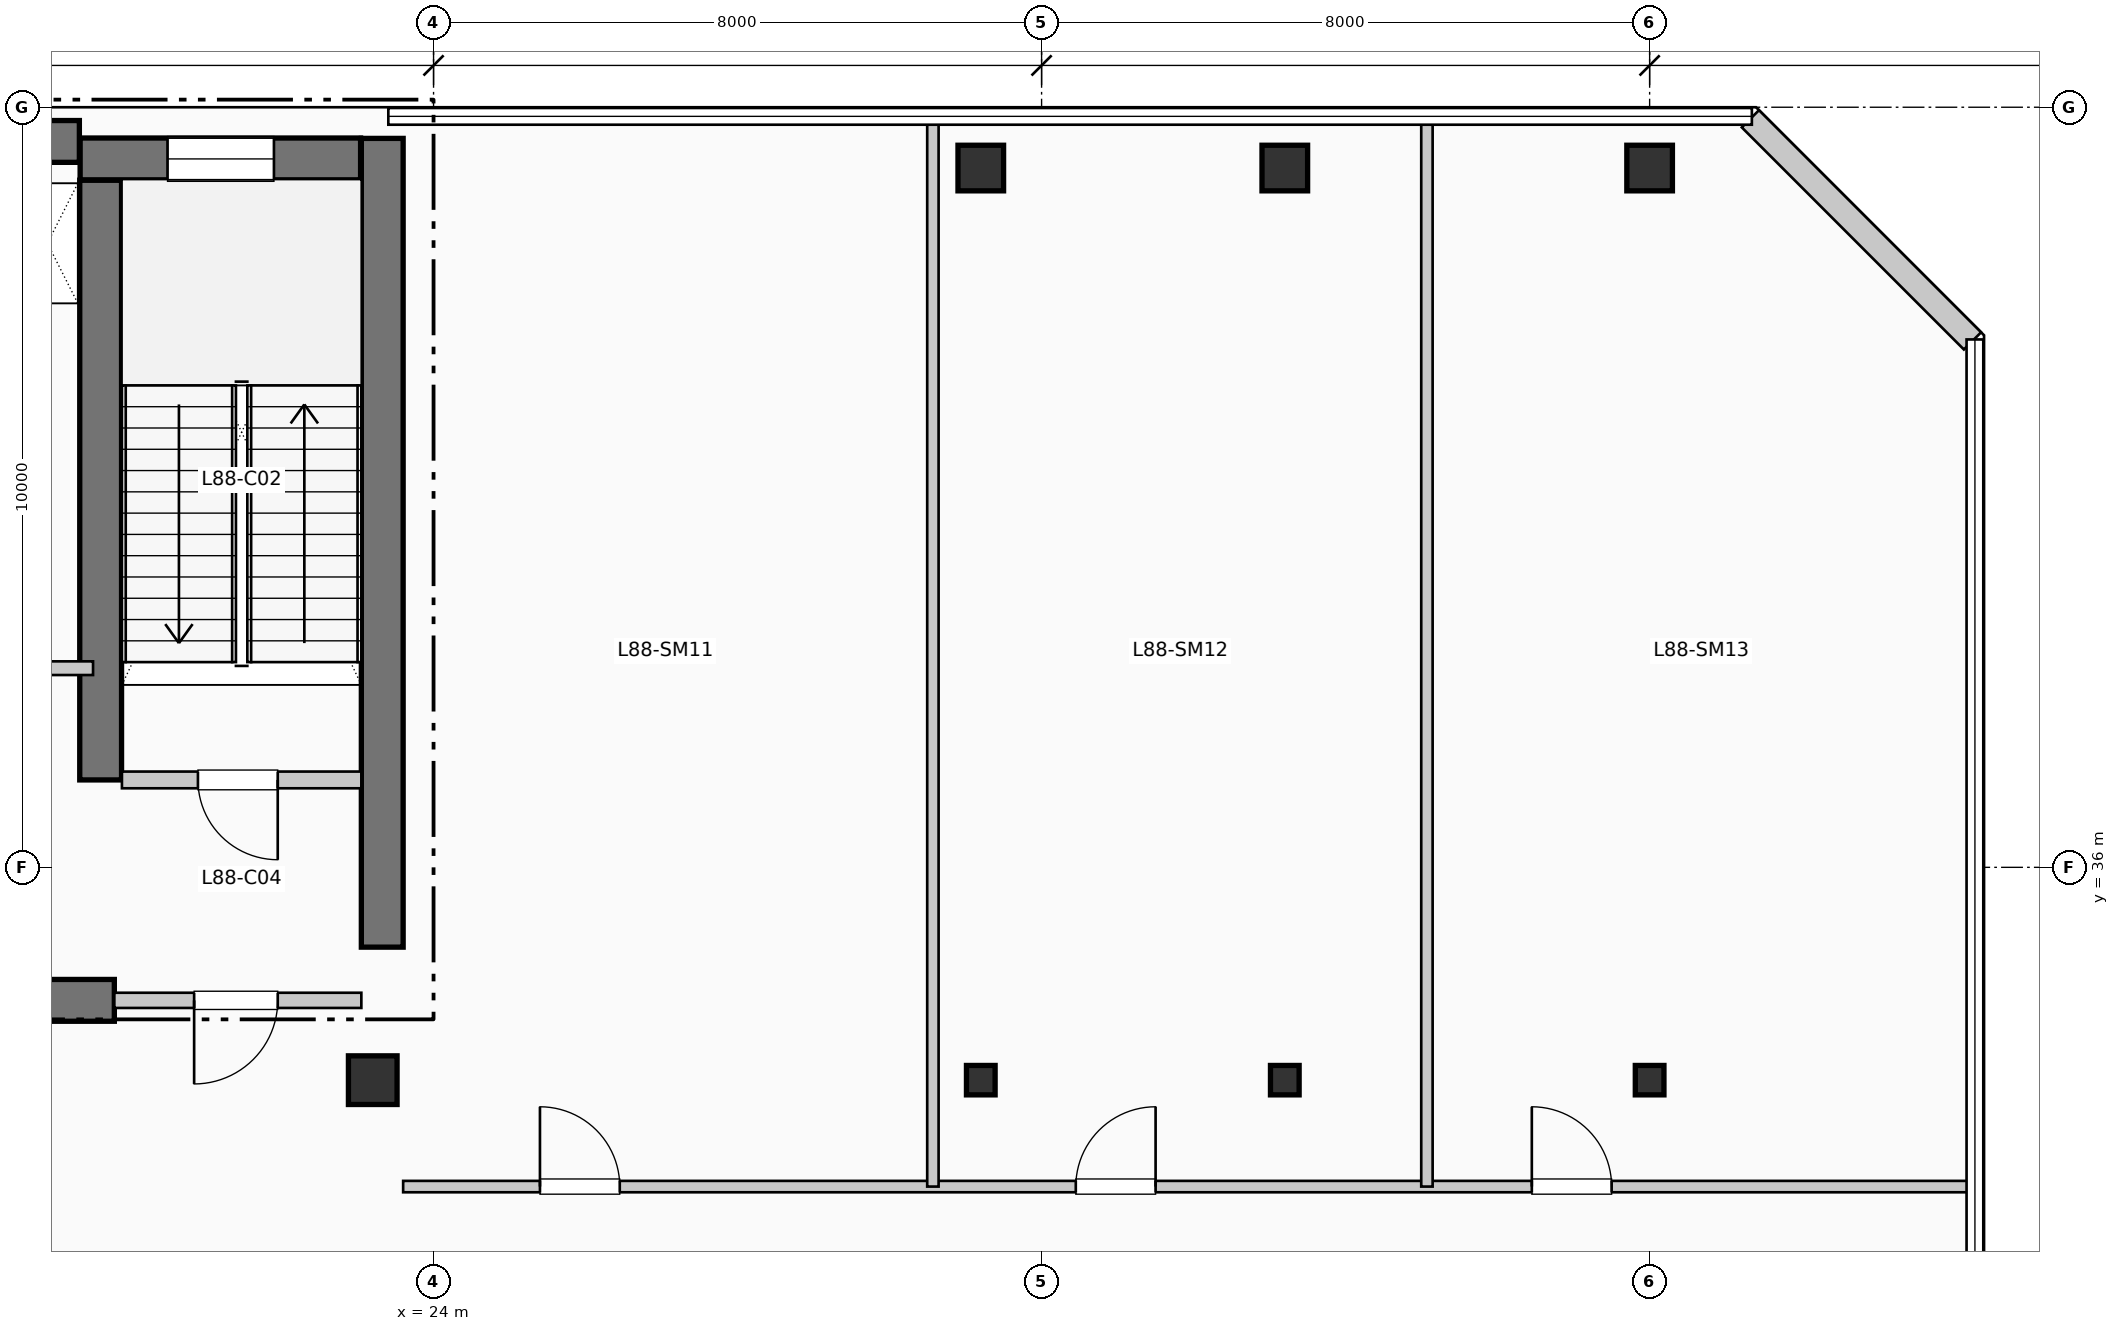
"""IFC4 building model, lengths in metres.
Left out: names, types, materials, properties, quantities, classifications, styles, units other than length and angle.
Written with IfcOpenShell. Run it as: python <this file> out.ifc"""

import sys

from ifc_helpers import new_model, si_unit, direction, frame, frame_2d, origin, origin_2d, place, context, subcontext, project, spatial, rectangle, i_section, extrude, element, fill, save


model = new_model("IFC4")
c1 = context("Model", 3, precision=1e-05, world=origin(), true_north=direction((0.0, 1.0)))
c2 = subcontext(c1, "Body", "Model", "MODEL_VIEW")
j1 = project(units=[si_unit("LENGTHUNIT", "METRE"), si_unit("PLANEANGLEUNIT", "RADIAN")], contexts=[c1])
p1 = place(None, origin())
s1 = spatial("IfcSite", under=j1, at=p1, CompositionType="ELEMENT")
p2 = place(p1, origin())
s2 = spatial("IfcBuilding", under=s1, at=p2, CompositionType="ELEMENT")
p3 = place(p2, frame((0.0, 0.0, 361.35)))
s3 = spatial("IfcBuildingStorey", under=s2, at=p3, CompositionType="ELEMENT", Elevation=361.35)
p4 = place(p3, frame((5.36, 45.55, 0.0), z_axis=(0.0, 0.0, 1.0), x_axis=(1.0, 0.0, 0.0)))
e1 = element("IfcWall", 1, at=p4, inside=s3, PredefinedType="SHEAR", context=c2, shape_type="SweptSolid", body=[
    extrude(rectangle(XDim=13.98, YDim=0.55, at=frame_2d((6.99, 0.0))), origin(), (0.0, 0.0, 1.0), 4.62),
])
p5 = place(p3, frame((23.325, 34.95, 0.0), z_axis=(0.0, 0.0, 1.0), x_axis=(0.0, 1.0, 0.0)))
e2 = element("IfcWall", 2, at=p5, inside=s3, PredefinedType="SHEAR", context=c2, shape_type="SweptSolid", body=[
    extrude(rectangle(XDim=10.64, YDim=0.55, at=frame_2d((5.32, 0.0))), origin(), (0.0, 0.0, 1.0), 4.62),
])
p6 = place(p3, frame((13.68, 34.25, 0.0), z_axis=(0.0, 0.0, 1.0), x_axis=(1.0, 0.0, 0.0)))
e3 = element("IfcWall", 3, at=p6, inside=s3, PredefinedType="SHEAR", context=c2, shape_type="SweptSolid", body=[
    extrude(rectangle(XDim=6.12, YDim=0.55, at=frame_2d((3.06, 0.0))), origin(), (0.0, 0.0, 1.0), 4.62),
])
p7 = place(p3, frame((19.62, 37.15, 0.0), z_axis=(0.0, 0.0, 1.0), x_axis=(0.0, 1.0, 0.0)))
e4 = element("IfcWall", 4, at=p7, inside=s3, PredefinedType="SHEAR", context=c2, shape_type="SweptSolid", body=[
    extrude(rectangle(XDim=7.89, YDim=0.55, at=frame_2d((3.945, 0.0))), origin(), (0.0, 0.0, 1.0), 4.62),
])
p8 = place(p3, frame((19.35, 45.32, 0.0), z_axis=(0.0, 0.0, 1.0), x_axis=(1.0, 0.0, 0.0)))
e5 = element("IfcWall", 5, at=p8, inside=s3, PredefinedType="SHEAR", context=c2, shape_type="SweptSolid", body=[
    extrude(rectangle(XDim=3.69, YDim=0.55, at=frame_2d((1.845, 0.0))), origin(), (0.0, 0.0, 1.0), 4.62),
])
p9 = place(p8, frame((1.15, 0.0, 1.05)))
e6 = element("IfcOpeningElement", 6, at=p9, cuts=e5, PredefinedType="OPENING", context=c2, shape_type="SweptSolid", body=[
    extrude(rectangle(XDim=1.4, YDim=1.8, at=frame_2d((0.7, 0.9))), frame((0.0, 0.285, 0.0), z_axis=(0.0, -1.0, 0.0), x_axis=(1.0, 0.0, 0.0)), (0.0, 0.0, 1.0), 0.57),
])
p10 = place(p3, frame((23.2, 33.2, 0.0), z_axis=(0.0, 0.0, 1.0), x_axis=(1.0, 0.0, 0.0)))
e7 = element("IfcColumn", 7, at=p10, inside=s3, PredefinedType="COLUMN", context=c2, shape_type="SweptSolid", body=[
    extrude(rectangle(XDim=0.64, YDim=0.64, at=origin_2d()), origin(), (0.0, 0.0, 1.0), 4.62),
])
p11 = place(p3, frame((31.2, 33.2, 0.0), z_axis=(0.0, 0.0, 1.0), x_axis=(1.0, 0.0, 0.0)))
e8 = element("IfcColumn", 8, at=p11, inside=s3, PredefinedType="COLUMN", context=c2, shape_type="SweptSolid", body=[
    extrude(i_section(OverallWidth=0.377, OverallDepth=0.387, WebThickness=0.016, FlangeThickness=0.027, at=origin_2d()), origin(), (0.0, 0.0, 1.0), 4.62),
])
p12 = place(p3, frame((31.2, 45.2, 0.0), z_axis=(0.0, 0.0, 1.0), x_axis=(1.0, 0.0, 0.0)))
e9 = element("IfcColumn", 9, at=p12, inside=s3, PredefinedType="COLUMN", context=c2, shape_type="SweptSolid", body=[
    extrude(rectangle(XDim=0.6, YDim=0.6, at=origin_2d()), origin(), (0.0, 0.0, 1.0), 4.62),
])
p13 = place(p3, frame((35.2, 33.2, 0.0), z_axis=(0.0, 0.0, 1.0), x_axis=(1.0, 0.0, 0.0)))
e10 = element("IfcColumn", 10, at=p13, inside=s3, PredefinedType="COLUMN", context=c2, shape_type="SweptSolid", body=[
    extrude(i_section(OverallWidth=0.377, OverallDepth=0.387, WebThickness=0.016, FlangeThickness=0.027, at=origin_2d()), origin(), (0.0, 0.0, 1.0), 4.62),
])
p14 = place(p3, frame((35.2, 45.2, 0.0), z_axis=(0.0, 0.0, 1.0), x_axis=(1.0, 0.0, 0.0)))
e11 = element("IfcColumn", 11, at=p14, inside=s3, PredefinedType="COLUMN", context=c2, shape_type="SweptSolid", body=[
    extrude(rectangle(XDim=0.6, YDim=0.6, at=origin_2d()), origin(), (0.0, 0.0, 1.0), 4.62),
])
p15 = place(p3, frame((40.0, 33.2, 0.0), z_axis=(0.0, 0.0, 1.0), x_axis=(1.0, 0.0, 0.0)))
e12 = element("IfcColumn", 12, at=p15, inside=s3, PredefinedType="COLUMN", context=c2, shape_type="SweptSolid", body=[
    extrude(i_section(OverallWidth=0.377, OverallDepth=0.387, WebThickness=0.016, FlangeThickness=0.027, at=origin_2d()), origin(), (0.0, 0.0, 1.0), 4.62),
])
p16 = place(p3, frame((40.0, 45.2, 0.0), z_axis=(0.0, 0.0, 1.0), x_axis=(1.0, 0.0, 0.0)))
e13 = element("IfcColumn", 13, at=p16, inside=s3, PredefinedType="COLUMN", context=c2, shape_type="SweptSolid", body=[
    extrude(rectangle(XDim=0.6, YDim=0.6, at=origin_2d()), origin(), (0.0, 0.0, 1.0), 4.62),
])
p17 = place(p3, frame((44.248, 42.926, 0.0), z_axis=(0.0, 0.0, 1.0), x_axis=(-0.707136318428, 0.707077242712, 0.0)))
e14 = element("IfcWall", 14, at=p17, inside=s3, PredefinedType="SOLIDWALL", context=c2, shape_type="SweptSolid", body=[
    extrude(rectangle(XDim=4.133, YDim=0.32, at=frame_2d((2.066, 0.0))), origin(), (0.0, 0.0, 1.0), 4.27),
])
p18 = place(p3, frame((19.9, 37.15, 0.0), z_axis=(0.0, 0.0, 1.0), x_axis=(1.0, 0.0, 0.0)))
e15 = element("IfcWall", 15, at=p18, inside=s3, PredefinedType="PARTITIONING", context=c2, shape_type="SweptSolid", body=[
    extrude(rectangle(XDim=3.15, YDim=0.22, at=frame_2d((1.575, 0.0))), origin(), (0.0, 0.0, 1.0), 4.27),
])
p19 = place(p18, frame((2.05, 0.0, 0.0), z_axis=(0.0, 0.0, 1.0), x_axis=(-1.0, 0.0, 0.0)))
e16 = element("IfcOpeningElement", 16, at=p19, cuts=e15, PredefinedType="OPENING", context=c2, shape_type="SweptSolid", body=[
    extrude(rectangle(XDim=1.05, YDim=2.15, at=frame_2d((0.525, 1.075))), frame((0.0, 0.12, 0.0), z_axis=(0.0, -1.0, 0.0), x_axis=(1.0, 0.0, 0.0)), (0.0, 0.0, 1.0), 0.24),
])
p20 = place(p3, frame((19.8, 34.25, 0.0), z_axis=(0.0, 0.0, 1.0), x_axis=(1.0, 0.0, 0.0)))
e17 = element("IfcWall", 17, at=p20, inside=s3, PredefinedType="PARTITIONING", context=c2, shape_type="SweptSolid", body=[
    extrude(rectangle(XDim=3.25, YDim=0.2, at=frame_2d((1.625, 0.0))), origin(), (0.0, 0.0, 1.0), 4.27),
])
p21 = place(p20, frame((2.15, 0.0, 0.0), z_axis=(0.0, 0.0, 1.0), x_axis=(-1.0, 0.0, 0.0)))
e18 = element("IfcOpeningElement", 18, at=p21, cuts=e17, PredefinedType="OPENING", context=c2, shape_type="SweptSolid", body=[
    extrude(rectangle(XDim=1.1, YDim=2.15, at=frame_2d((0.55, 1.075))), frame((0.0, 0.11, 0.0), z_axis=(0.0, -1.0, 0.0), x_axis=(1.0, 0.0, 0.0)), (0.0, 0.0, 1.0), 0.22),
])
p22 = place(p3, frame((17.68, 38.62, 0.0), z_axis=(0.0, 0.0, 1.0), x_axis=(1.0, 0.0, 0.0)))
e19 = element("IfcWall", 19, at=p22, inside=s3, PredefinedType="PARTITIONING", context=c2, shape_type="SweptSolid", body=[
    extrude(rectangle(XDim=1.84, YDim=0.18, at=frame_2d((0.92, 0.0))), origin(), (0.0, 0.0, 1.0), 4.27),
])
p23 = place(p22, frame((0.24, 0.0, 0.0)))
e20 = element("IfcOpeningElement", 20, at=p23, cuts=e19, PredefinedType="OPENING", context=c2, shape_type="SweptSolid", body=[
    extrude(rectangle(XDim=0.92, YDim=2.1, at=frame_2d((0.46, 1.05))), frame((0.0, 0.1, 0.0), z_axis=(0.0, -1.0, 0.0), x_axis=(1.0, 0.0, 0.0)), (0.0, 0.0, 1.0), 0.2),
])
p24 = place(p3, frame((23.6, 31.8, 0.0), z_axis=(0.0, 0.0, 1.0), x_axis=(1.0, 0.0, 0.0)))
e21 = element("IfcWall", 21, at=p24, inside=s3, PredefinedType="PARTITIONING", context=c2, shape_type="SweptSolid", body=[
    extrude(rectangle(XDim=20.61, YDim=0.15, at=frame_2d((10.305, 0.0))), origin(), (0.0, 0.0, 1.0), 4.27),
])
p25 = place(p24, frame((1.8, 0.0, 0.0)))
e22 = element("IfcOpeningElement", 22, at=p25, cuts=e21, PredefinedType="OPENING", context=c2, shape_type="SweptSolid", body=[
    extrude(rectangle(XDim=1.05, YDim=2.15, at=frame_2d((0.525, 1.075))), frame((0.0, 0.085, 0.0), z_axis=(0.0, -1.0, 0.0), x_axis=(1.0, 0.0, 0.0)), (0.0, 0.0, 1.0), 0.17),
])
p26 = place(p24, frame((8.85, 0.0, 0.0)))
e23 = element("IfcOpeningElement", 23, at=p26, cuts=e21, PredefinedType="OPENING", context=c2, shape_type="SweptSolid", body=[
    extrude(rectangle(XDim=1.05, YDim=2.15, at=frame_2d((0.525, 1.075))), frame((0.0, 0.085, 0.0), z_axis=(0.0, -1.0, 0.0), x_axis=(1.0, 0.0, 0.0)), (0.0, 0.0, 1.0), 0.17),
])
p27 = place(p24, frame((14.85, 0.0, 0.0)))
e24 = element("IfcOpeningElement", 24, at=p27, cuts=e21, PredefinedType="OPENING", context=c2, shape_type="SweptSolid", body=[
    extrude(rectangle(XDim=1.05, YDim=2.15, at=frame_2d((0.525, 1.075))), frame((0.0, 0.085, 0.0), z_axis=(0.0, -1.0, 0.0), x_axis=(1.0, 0.0, 0.0)), (0.0, 0.0, 1.0), 0.17),
])
for number, where, z_axis, x_axis in (
    (25, (30.57, 31.8, 0.0), (0.0, 0.0, 1.0), (0.0, 1.0, 0.0)),
    (26, (37.07, 31.8, 0.0), (0.0, 0.0, 1.0), (0.0, 1.0, 0.0)),
):
    element("IfcWall", number, at=place(p3, frame(where, z_axis=z_axis, x_axis=x_axis)), inside=s3, PredefinedType="PARTITIONING", context=c2, shape_type="SweptSolid", body=[
        extrude(rectangle(XDim=14.01, YDim=0.15, at=frame_2d((7.005, 0.0))), origin(), (0.0, 0.0, 1.0), 4.27),
    ])
p28 = place(p9, origin())
e27 = element("IfcWindow", 27, at=p28, inside=s3, PartitioningType="SINGLE_PANEL", PredefinedType="WINDOW", context=c2, shape_type="SweptSolid", body=[
    extrude(rectangle(XDim=1.4, YDim=1.8, at=frame_2d((0.7, 0.9))), frame((0.0, 0.03, 0.0), z_axis=(0.0, -1.0, 0.0), x_axis=(1.0, 0.0, 0.0)), (0.0, 0.0, 1.0), 0.06),
])
fill(e6, e27)
p29 = place(p19, origin())
e28 = element("IfcDoor", 28, at=p29, inside=s3, OperationType="SINGLE_SWING_RIGHT", PredefinedType="DOOR", context=c2, shape_type="SweptSolid", body=[
    extrude(rectangle(XDim=1.05, YDim=2.15, at=frame_2d((0.525, 1.075))), frame((0.0, 0.025, 0.0), z_axis=(0.0, -1.0, 0.0), x_axis=(1.0, 0.0, 0.0)), (0.0, 0.0, 1.0), 0.05),
])
fill(e16, e28)
p30 = place(p21, origin())
e29 = element("IfcDoor", 29, at=p30, inside=s3, OperationType="SINGLE_SWING_LEFT", PredefinedType="DOOR", context=c2, shape_type="SweptSolid", body=[
    extrude(rectangle(XDim=1.1, YDim=2.15, at=frame_2d((0.55, 1.075))), frame((0.0, 0.025, 0.0), z_axis=(0.0, -1.0, 0.0), x_axis=(1.0, 0.0, 0.0)), (0.0, 0.0, 1.0), 0.05),
])
fill(e18, e29)
p31 = place(p25, origin())
e30 = element("IfcDoor", 30, at=p31, inside=s3, OperationType="SINGLE_SWING_LEFT", PredefinedType="DOOR", context=c2, shape_type="SweptSolid", body=[
    extrude(rectangle(XDim=1.05, YDim=2.15, at=frame_2d((0.525, 1.075))), frame((0.0, 0.025, 0.0), z_axis=(0.0, -1.0, 0.0), x_axis=(1.0, 0.0, 0.0)), (0.0, 0.0, 1.0), 0.05),
])
fill(e22, e30)
p32 = place(p26, origin())
e31 = element("IfcDoor", 31, at=p32, inside=s3, OperationType="SINGLE_SWING_RIGHT", PredefinedType="DOOR", context=c2, shape_type="SweptSolid", body=[
    extrude(rectangle(XDim=1.05, YDim=2.15, at=frame_2d((0.525, 1.075))), frame((0.0, 0.025, 0.0), z_axis=(0.0, -1.0, 0.0), x_axis=(1.0, 0.0, 0.0)), (0.0, 0.0, 1.0), 0.05),
])
fill(e23, e31)
p33 = place(p27, origin())
e32 = element("IfcDoor", 32, at=p33, inside=s3, OperationType="SINGLE_SWING_LEFT", PredefinedType="DOOR", context=c2, shape_type="SweptSolid", body=[
    extrude(rectangle(XDim=1.05, YDim=2.15, at=frame_2d((0.525, 1.075))), frame((0.0, 0.025, 0.0), z_axis=(0.0, -1.0, 0.0), x_axis=(1.0, 0.0, 0.0)), (0.0, 0.0, 1.0), 0.05),
])
fill(e24, e32)
save(model, sys.argv[1])
